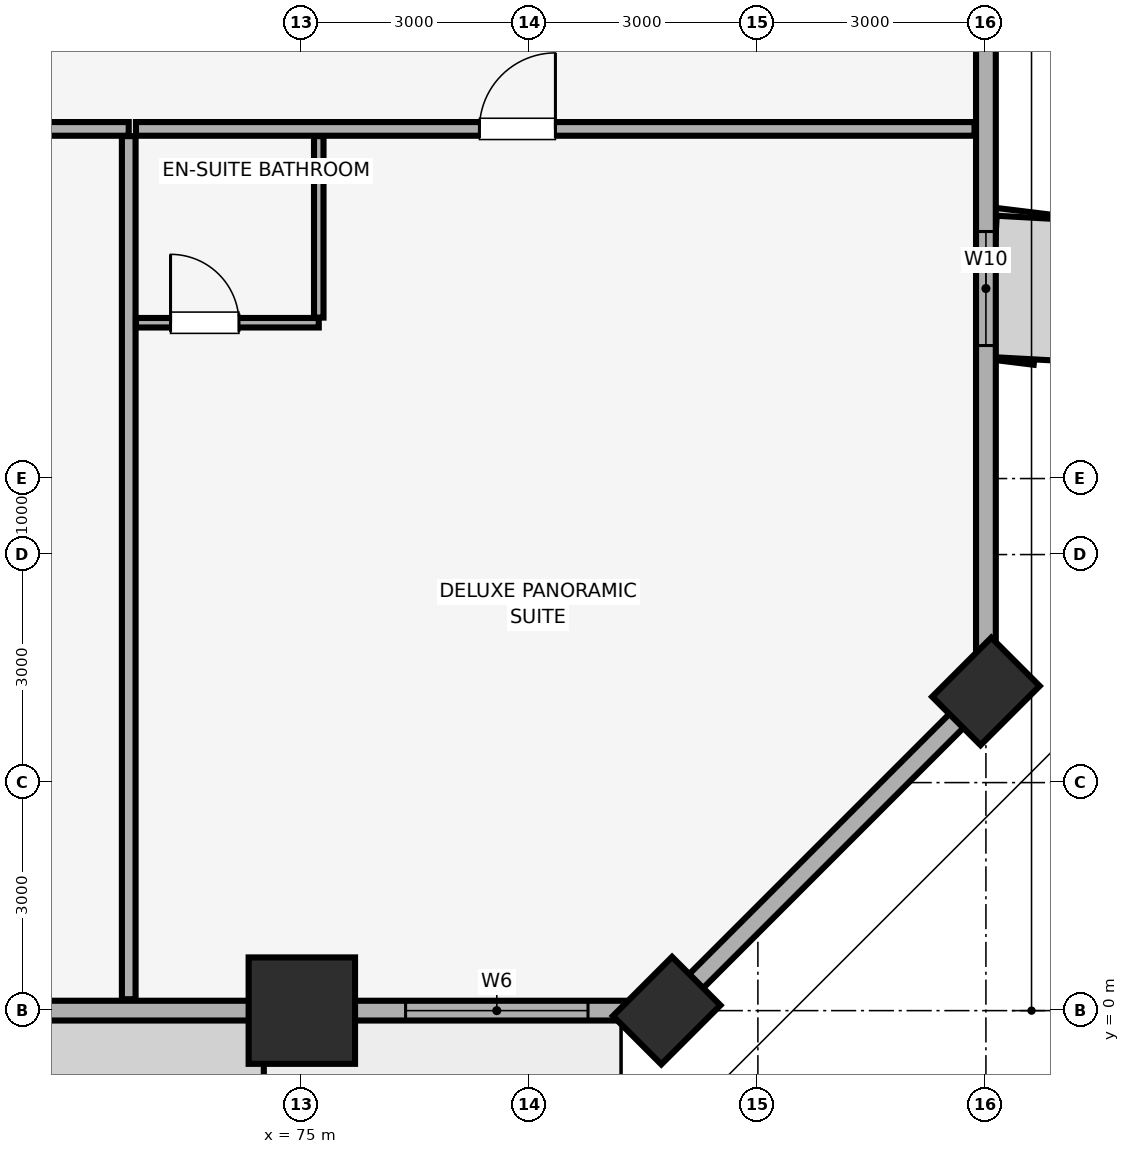
"""IFC4 building model, lengths in metres.
Left out: names, types, materials, properties, quantities, classifications, styles, units other than length and angle.
Written with IfcOpenShell. Run it as: python <this file> out.ifc"""

import sys

from ifc_helpers import new_model, si_unit, direction, frame, frame_2d, origin, origin_2d, place, context, subcontext, project, spatial, rectangle, extrude, element, fill, save


model = new_model("IFC4")
c1 = context("Model", 3, precision=1e-05, world=origin(), true_north=direction((0.0, 1.0)))
c2 = subcontext(c1, "Body", "Model", "MODEL_VIEW")
j1 = project(units=[si_unit("LENGTHUNIT", "METRE"), si_unit("PLANEANGLEUNIT", "RADIAN")], contexts=[c1])
p1 = place(None, origin())
s1 = spatial("IfcSite", under=j1, at=p1, CompositionType="ELEMENT")
p2 = place(p1, origin())
s2 = spatial("IfcBuilding", under=s1, at=p2, CompositionType="ELEMENT")
p3 = place(p2, frame((0.0, 0.0, 57.65)))
s3 = spatial("IfcBuildingStorey", under=s2, at=p3, CompositionType="ELEMENT", Elevation=57.65)
p4 = place(p3, frame((75.0, 0.0, 0.0), z_axis=(0.0, 0.0, 1.0), x_axis=(1.0, 0.0, 0.0)))
e1 = element("IfcColumn", 1, at=p4, inside=s3, PredefinedType="COLUMN", context=c2, shape_type="SweptSolid", body=[
    extrude(rectangle(XDim=1.4, YDim=1.4, at=origin_2d()), origin(), (0.0, 0.0, 1.0), 3.51),
])
for number, where, z_axis, x_axis in (
    (2, (79.8, 0.0, 0.0), (0.0, 0.0, 1.0), (0.707, 0.707, 0.0)),
    (3, (84.0, 4.2, 0.0), (0.0, 0.0, 1.0), (0.707, 0.707, 0.0)),
):
    element("IfcColumn", number, at=place(p3, frame(where, z_axis=z_axis, x_axis=x_axis)), inside=s3, PredefinedType="PILASTER", context=c2, shape_type="SweptSolid", body=[
        extrude(rectangle(XDim=1.1, YDim=0.9, at=origin_2d()), origin(), (0.0, 0.0, 1.0), 3.51),
    ])
p5 = place(p3, frame((4.2, 0.0, 0.0), z_axis=(0.0, 0.0, 1.0), x_axis=(1.0, 0.0, 0.0)))
e4 = element("IfcWall", 4, at=p5, inside=s3, PredefinedType="SOLIDWALL", context=c2, shape_type="SweptSolid", body=[
    extrude(rectangle(XDim=75.6, YDim=0.26, at=frame_2d((37.8, 0.0))), origin(), (0.0, 0.0, 1.0), 2.56),
])
p6 = place(p5, frame((21.383, 0.0, 0.0)))
e5 = element("IfcOpeningElement", 5, at=p6, cuts=e4, PredefinedType="OPENING", context=c2, shape_type="SweptSolid", body=[
    extrude(rectangle(XDim=1.1, YDim=2.15, at=frame_2d((0.55, 1.075))), frame((0.0, 0.14, 0.0), z_axis=(0.0, -1.0, 0.0), x_axis=(1.0, 0.0, 0.0)), (0.0, 0.0, 1.0), 0.28),
])
p7 = place(p5, frame((37.25, 0.0, 0.0)))
e6 = element("IfcOpeningElement", 6, at=p7, cuts=e4, PredefinedType="OPENING", context=c2, shape_type="SweptSolid", body=[
    extrude(rectangle(XDim=1.1, YDim=2.15, at=frame_2d((0.55, 1.075))), frame((0.0, 0.14, 0.0), z_axis=(0.0, -1.0, 0.0), x_axis=(1.0, 0.0, 0.0)), (0.0, 0.0, 1.0), 0.28),
])
p8 = place(p5, frame((53.117, 0.0, 0.0)))
e7 = element("IfcOpeningElement", 7, at=p8, cuts=e4, PredefinedType="OPENING", context=c2, shape_type="SweptSolid", body=[
    extrude(rectangle(XDim=1.1, YDim=2.15, at=frame_2d((0.55, 1.075))), frame((0.0, 0.14, 0.0), z_axis=(0.0, -1.0, 0.0), x_axis=(1.0, 0.0, 0.0)), (0.0, 0.0, 1.0), 0.28),
])
p9 = place(p5, frame((1.035, 0.0, 0.85)))
e8 = element("IfcOpeningElement", 8, at=p9, cuts=e4, PredefinedType="OPENING", context=c2, shape_type="SweptSolid", body=[
    extrude(rectangle(XDim=2.4, YDim=1.5, at=frame_2d((1.2, 0.75))), frame((0.0, 0.14, 0.0), z_axis=(0.0, -1.0, 0.0), x_axis=(1.0, 0.0, 0.0)), (0.0, 0.0, 1.0), 0.28),
])
p10 = place(p5, frame((8.138, 0.0, 0.85)))
e9 = element("IfcOpeningElement", 9, at=p10, cuts=e4, PredefinedType="OPENING", context=c2, shape_type="SweptSolid", body=[
    extrude(rectangle(XDim=2.4, YDim=1.5, at=frame_2d((1.2, 0.75))), frame((0.0, 0.14, 0.0), z_axis=(0.0, -1.0, 0.0), x_axis=(1.0, 0.0, 0.0)), (0.0, 0.0, 1.0), 0.28),
])
p11 = place(p5, frame((15.153, 0.0, 0.85)))
e10 = element("IfcOpeningElement", 10, at=p11, cuts=e4, PredefinedType="OPENING", context=c2, shape_type="SweptSolid", body=[
    extrude(rectangle(XDim=2.4, YDim=1.5, at=frame_2d((1.2, 0.75))), frame((0.0, 0.14, 0.0), z_axis=(0.0, -1.0, 0.0), x_axis=(1.0, 0.0, 0.0)), (0.0, 0.0, 1.0), 0.28),
])
p12 = place(p5, frame((23.127, 0.0, 0.85)))
e11 = element("IfcOpeningElement", 11, at=p12, cuts=e4, PredefinedType="OPENING", context=c2, shape_type="SweptSolid", body=[
    extrude(rectangle(XDim=2.4, YDim=1.5, at=frame_2d((1.2, 0.75))), frame((0.0, 0.14, 0.0), z_axis=(0.0, -1.0, 0.0), x_axis=(1.0, 0.0, 0.0)), (0.0, 0.0, 1.0), 0.28),
])
p13 = place(p5, frame((29.179, 0.0, 0.85)))
e12 = element("IfcOpeningElement", 12, at=p13, cuts=e4, PredefinedType="OPENING", context=c2, shape_type="SweptSolid", body=[
    extrude(rectangle(XDim=2.4, YDim=1.5, at=frame_2d((1.2, 0.75))), frame((0.0, 0.14, 0.0), z_axis=(0.0, -1.0, 0.0), x_axis=(1.0, 0.0, 0.0)), (0.0, 0.0, 1.0), 0.28),
])
p14 = place(p5, frame((34.983, 0.0, 0.85)))
e13 = element("IfcOpeningElement", 13, at=p14, cuts=e4, PredefinedType="OPENING", context=c2, shape_type="SweptSolid", body=[
    extrude(rectangle(XDim=1.5, YDim=1.4, at=frame_2d((0.75, 0.7))), frame((0.0, 0.14, 0.0), z_axis=(0.0, -1.0, 0.0), x_axis=(1.0, 0.0, 0.0)), (0.0, 0.0, 1.0), 0.28),
])
p15 = place(p5, frame((39.117, 0.0, 0.85)))
e14 = element("IfcOpeningElement", 14, at=p15, cuts=e4, PredefinedType="OPENING", context=c2, shape_type="SweptSolid", body=[
    extrude(rectangle(XDim=1.5, YDim=1.4, at=frame_2d((0.75, 0.7))), frame((0.0, 0.14, 0.0), z_axis=(0.0, -1.0, 0.0), x_axis=(1.0, 0.0, 0.0)), (0.0, 0.0, 1.0), 0.28),
])
p16 = place(p5, frame((44.021, 0.0, 0.85)))
e15 = element("IfcOpeningElement", 15, at=p16, cuts=e4, PredefinedType="OPENING", context=c2, shape_type="SweptSolid", body=[
    extrude(rectangle(XDim=2.4, YDim=1.5, at=frame_2d((1.2, 0.75))), frame((0.0, 0.14, 0.0), z_axis=(0.0, -1.0, 0.0), x_axis=(1.0, 0.0, 0.0)), (0.0, 0.0, 1.0), 0.28),
])
p17 = place(p5, frame((50.073, 0.0, 0.85)))
e16 = element("IfcOpeningElement", 16, at=p17, cuts=e4, PredefinedType="OPENING", context=c2, shape_type="SweptSolid", body=[
    extrude(rectangle(XDim=2.4, YDim=1.5, at=frame_2d((1.2, 0.75))), frame((0.0, 0.14, 0.0), z_axis=(0.0, -1.0, 0.0), x_axis=(1.0, 0.0, 0.0)), (0.0, 0.0, 1.0), 0.28),
])
p18 = place(p5, frame((58.048, 0.0, 0.85)))
e17 = element("IfcOpeningElement", 17, at=p18, cuts=e4, PredefinedType="OPENING", context=c2, shape_type="SweptSolid", body=[
    extrude(rectangle(XDim=2.4, YDim=1.5, at=frame_2d((1.2, 0.75))), frame((0.0, 0.14, 0.0), z_axis=(0.0, -1.0, 0.0), x_axis=(1.0, 0.0, 0.0)), (0.0, 0.0, 1.0), 0.28),
])
p19 = place(p5, frame((65.062, 0.0, 0.85)))
e18 = element("IfcOpeningElement", 18, at=p19, cuts=e4, PredefinedType="OPENING", context=c2, shape_type="SweptSolid", body=[
    extrude(rectangle(XDim=2.4, YDim=1.5, at=frame_2d((1.2, 0.75))), frame((0.0, 0.14, 0.0), z_axis=(0.0, -1.0, 0.0), x_axis=(1.0, 0.0, 0.0)), (0.0, 0.0, 1.0), 0.28),
])
p20 = place(p5, frame((72.165, 0.0, 0.85)))
e19 = element("IfcOpeningElement", 19, at=p20, cuts=e4, PredefinedType="OPENING", context=c2, shape_type="SweptSolid", body=[
    extrude(rectangle(XDim=2.4, YDim=1.5, at=frame_2d((1.2, 0.75))), frame((0.0, 0.14, 0.0), z_axis=(0.0, -1.0, 0.0), x_axis=(1.0, 0.0, 0.0)), (0.0, 0.0, 1.0), 0.28),
])
p21 = place(p3, frame((79.8, 0.0, 0.0), z_axis=(0.0, 0.0, 1.0), x_axis=(0.707106781187, 0.707106781187, 0.0)))
e20 = element("IfcWall", 20, at=p21, inside=s3, PredefinedType="SOLIDWALL", context=c2, shape_type="SweptSolid", body=[
    extrude(rectangle(XDim=5.94, YDim=0.26, at=frame_2d((2.97, 0.0))), origin(), (0.0, 0.0, 1.0), 2.56),
])
p22 = place(p3, frame((84.0, 4.2, 0.0), z_axis=(0.0, 0.0, 1.0), x_axis=(0.0, 1.0, 0.0)))
e21 = element("IfcWall", 21, at=p22, inside=s3, PredefinedType="SOLIDWALL", context=c2, shape_type="SweptSolid", body=[
    extrude(rectangle(XDim=40.6, YDim=0.26, at=frame_2d((20.3, 0.0))), origin(), (0.0, 0.0, 1.0), 2.56),
])
p23 = place(p22, frame((4.55, 0.0, 0.85)))
e22 = element("IfcOpeningElement", 22, at=p23, cuts=e21, PredefinedType="OPENING", context=c2, shape_type="SweptSolid", body=[
    extrude(rectangle(XDim=1.5, YDim=1.4, at=frame_2d((0.75, 0.7))), frame((0.0, 0.14, 0.0), z_axis=(0.0, -1.0, 0.0), x_axis=(1.0, 0.0, 0.0)), (0.0, 0.0, 1.0), 0.28),
])
p24 = place(p22, frame((13.46, 0.0, 0.85)))
e23 = element("IfcOpeningElement", 23, at=p24, cuts=e21, PredefinedType="OPENING", context=c2, shape_type="SweptSolid", body=[
    extrude(rectangle(XDim=1.5, YDim=1.4, at=frame_2d((0.75, 0.7))), frame((0.0, 0.14, 0.0), z_axis=(0.0, -1.0, 0.0), x_axis=(1.0, 0.0, 0.0)), (0.0, 0.0, 1.0), 0.28),
])
p25 = place(p22, frame((20.26, 0.0, 0.85)))
e24 = element("IfcOpeningElement", 24, at=p25, cuts=e21, PredefinedType="OPENING", context=c2, shape_type="SweptSolid", body=[
    extrude(rectangle(XDim=1.5, YDim=1.4, at=frame_2d((0.75, 0.7))), frame((0.0, 0.14, 0.0), z_axis=(0.0, -1.0, 0.0), x_axis=(1.0, 0.0, 0.0)), (0.0, 0.0, 1.0), 0.28),
])
p26 = place(p22, frame((27.165, 0.0, 0.85)))
e25 = element("IfcOpeningElement", 25, at=p26, cuts=e21, PredefinedType="OPENING", context=c2, shape_type="SweptSolid", body=[
    extrude(rectangle(XDim=1.5, YDim=1.4, at=frame_2d((0.75, 0.7))), frame((0.0, 0.14, 0.0), z_axis=(0.0, -1.0, 0.0), x_axis=(1.0, 0.0, 0.0)), (0.0, 0.0, 1.0), 0.28),
])
p27 = place(p22, frame((31.935, 0.0, 0.85)))
e26 = element("IfcOpeningElement", 26, at=p27, cuts=e21, PredefinedType="OPENING", context=c2, shape_type="SweptSolid", body=[
    extrude(rectangle(XDim=1.5, YDim=1.4, at=frame_2d((0.75, 0.7))), frame((0.0, 0.14, 0.0), z_axis=(0.0, -1.0, 0.0), x_axis=(1.0, 0.0, 0.0)), (0.0, 0.0, 1.0), 0.28),
])
p28 = place(p22, frame((37.365, 0.0, 0.85)))
e27 = element("IfcOpeningElement", 27, at=p28, cuts=e21, PredefinedType="OPENING", context=c2, shape_type="SweptSolid", body=[
    extrude(rectangle(XDim=1.5, YDim=1.4, at=frame_2d((0.75, 0.7))), frame((0.0, 0.14, 0.0), z_axis=(0.0, -1.0, 0.0), x_axis=(1.0, 0.0, 0.0)), (0.0, 0.0, 1.0), 0.28),
])
p29 = place(p3, frame((65.99, 11.6, 0.0), z_axis=(0.0, 0.0, 1.0), x_axis=(1.0, 0.0, 0.0)))
e28 = element("IfcWall", 28, at=p29, inside=s3, PredefinedType="PARTITIONING", context=c2, shape_type="SweptSolid", body=[
    extrude(rectangle(XDim=6.732, YDim=0.18, at=frame_2d((3.366, 0.0))), origin(), (0.0, 0.0, 1.0), 3.51),
])
p30 = place(p29, frame((4.359, 0.0, 0.0)))
e29 = element("IfcOpeningElement", 29, at=p30, cuts=e28, PredefinedType="OPENING", context=c2, shape_type="SweptSolid", body=[
    extrude(rectangle(XDim=1.0, YDim=2.15, at=frame_2d((0.5, 1.075))), frame((0.0, 0.1, 0.0), z_axis=(0.0, -1.0, 0.0), x_axis=(1.0, 0.0, 0.0)), (0.0, 0.0, 1.0), 0.2),
])
p31 = place(p3, frame((72.723, 0.15, 0.0), z_axis=(0.0, 0.0, 1.0), x_axis=(0.0, 1.0, 0.0)))
e30 = element("IfcWall", 30, at=p31, inside=s3, PredefinedType="PARTITIONING", context=c2, shape_type="SweptSolid", body=[
    extrude(rectangle(XDim=11.355, YDim=0.18, at=frame_2d((5.677, 0.0))), origin(), (0.0, 0.0, 1.0), 3.51),
])
p32 = place(p3, frame((72.818, 11.6, 0.0), z_axis=(0.0, 0.0, 1.0), x_axis=(1.0, 0.0, 0.0)))
e31 = element("IfcWall", 31, at=p32, inside=s3, PredefinedType="PARTITIONING", context=c2, shape_type="SweptSolid", body=[
    extrude(rectangle(XDim=11.032, YDim=0.18, at=frame_2d((5.516, 0.0))), origin(), (0.0, 0.0, 1.0), 3.51),
])
p33 = place(p32, frame((4.519, 0.0, 0.0)))
e32 = element("IfcOpeningElement", 32, at=p33, cuts=e31, PredefinedType="OPENING", context=c2, shape_type="SweptSolid", body=[
    extrude(rectangle(XDim=1.0, YDim=2.15, at=frame_2d((0.5, 1.075))), frame((0.0, 0.1, 0.0), z_axis=(0.0, -1.0, 0.0), x_axis=(1.0, 0.0, 0.0)), (0.0, 0.0, 1.0), 0.2),
])
p34 = place(p3, frame((72.818, 9.05, 0.0), z_axis=(0.0, 0.0, 1.0), x_axis=(1.0, 0.0, 0.0)))
e33 = element("IfcWall", 33, at=p34, inside=s3, PredefinedType="PARTITIONING", context=c2, shape_type="SweptSolid", body=[
    extrude(rectangle(XDim=2.405, YDim=0.125, at=frame_2d((1.203, 0.0))), origin(), (0.0, 0.0, 1.0), 3.51),
])
p35 = place(p34, frame((0.455, 0.0, 0.0)))
e34 = element("IfcOpeningElement", 34, at=p35, cuts=e33, PredefinedType="OPENING", context=c2, shape_type="SweptSolid", body=[
    extrude(rectangle(XDim=0.9, YDim=2.1, at=frame_2d((0.45, 1.05))), frame((0.0, 0.073, 0.0), z_axis=(0.0, -1.0, 0.0), x_axis=(1.0, 0.0, 0.0)), (0.0, 0.0, 1.0), 0.145),
])
p36 = place(p3, frame((75.223, 9.117, 0.0), z_axis=(0.0, 0.0, 1.0), x_axis=(0.0, 1.0, 0.0)))
e35 = element("IfcWall", 35, at=p36, inside=s3, PredefinedType="PARTITIONING", context=c2, shape_type="SweptSolid", body=[
    extrude(rectangle(XDim=2.387, YDim=0.125, at=frame_2d((1.194, 0.0))), origin(), (0.0, 0.0, 1.0), 2.898),
])
p37 = place(p20, origin())
e36 = element("IfcWindow", 36, at=p37, inside=s3, PartitioningType="SINGLE_PANEL", PredefinedType="WINDOW", context=c2, shape_type="SweptSolid", body=[
    extrude(rectangle(XDim=2.4, YDim=1.5, at=frame_2d((1.2, 0.75))), frame((0.0, 0.03, 0.0), z_axis=(0.0, -1.0, 0.0), x_axis=(1.0, 0.0, 0.0)), (0.0, 0.0, 1.0), 0.06),
])
fill(e19, e36)
p38 = place(p23, origin())
e37 = element("IfcWindow", 37, at=p38, inside=s3, PartitioningType="SINGLE_PANEL", PredefinedType="WINDOW", context=c2, shape_type="SweptSolid", body=[
    extrude(rectangle(XDim=1.5, YDim=1.4, at=frame_2d((0.75, 0.7))), frame((0.0, 0.03, 0.0), z_axis=(0.0, -1.0, 0.0), x_axis=(1.0, 0.0, 0.0)), (0.0, 0.0, 1.0), 0.06),
])
fill(e22, e37)
p39 = place(p33, origin())
e38 = element("IfcDoor", 38, at=p39, inside=s3, OperationType="SINGLE_SWING_RIGHT", PredefinedType="DOOR", context=c2, shape_type="SweptSolid", body=[
    extrude(rectangle(XDim=1.0, YDim=2.15, at=frame_2d((0.5, 1.075))), frame((0.0, 0.025, 0.0), z_axis=(0.0, -1.0, 0.0), x_axis=(1.0, 0.0, 0.0)), (0.0, 0.0, 1.0), 0.05),
])
fill(e32, e38)
p40 = place(p35, origin())
e39 = element("IfcDoor", 39, at=p40, inside=s3, OperationType="SINGLE_SWING_LEFT", PredefinedType="DOOR", context=c2, shape_type="SweptSolid", body=[
    extrude(rectangle(XDim=0.9, YDim=2.1, at=frame_2d((0.45, 1.05))), frame((0.0, 0.025, 0.0), z_axis=(0.0, -1.0, 0.0), x_axis=(1.0, 0.0, 0.0)), (0.0, 0.0, 1.0), 0.05),
])
fill(e34, e39)
save(model, sys.argv[1])
